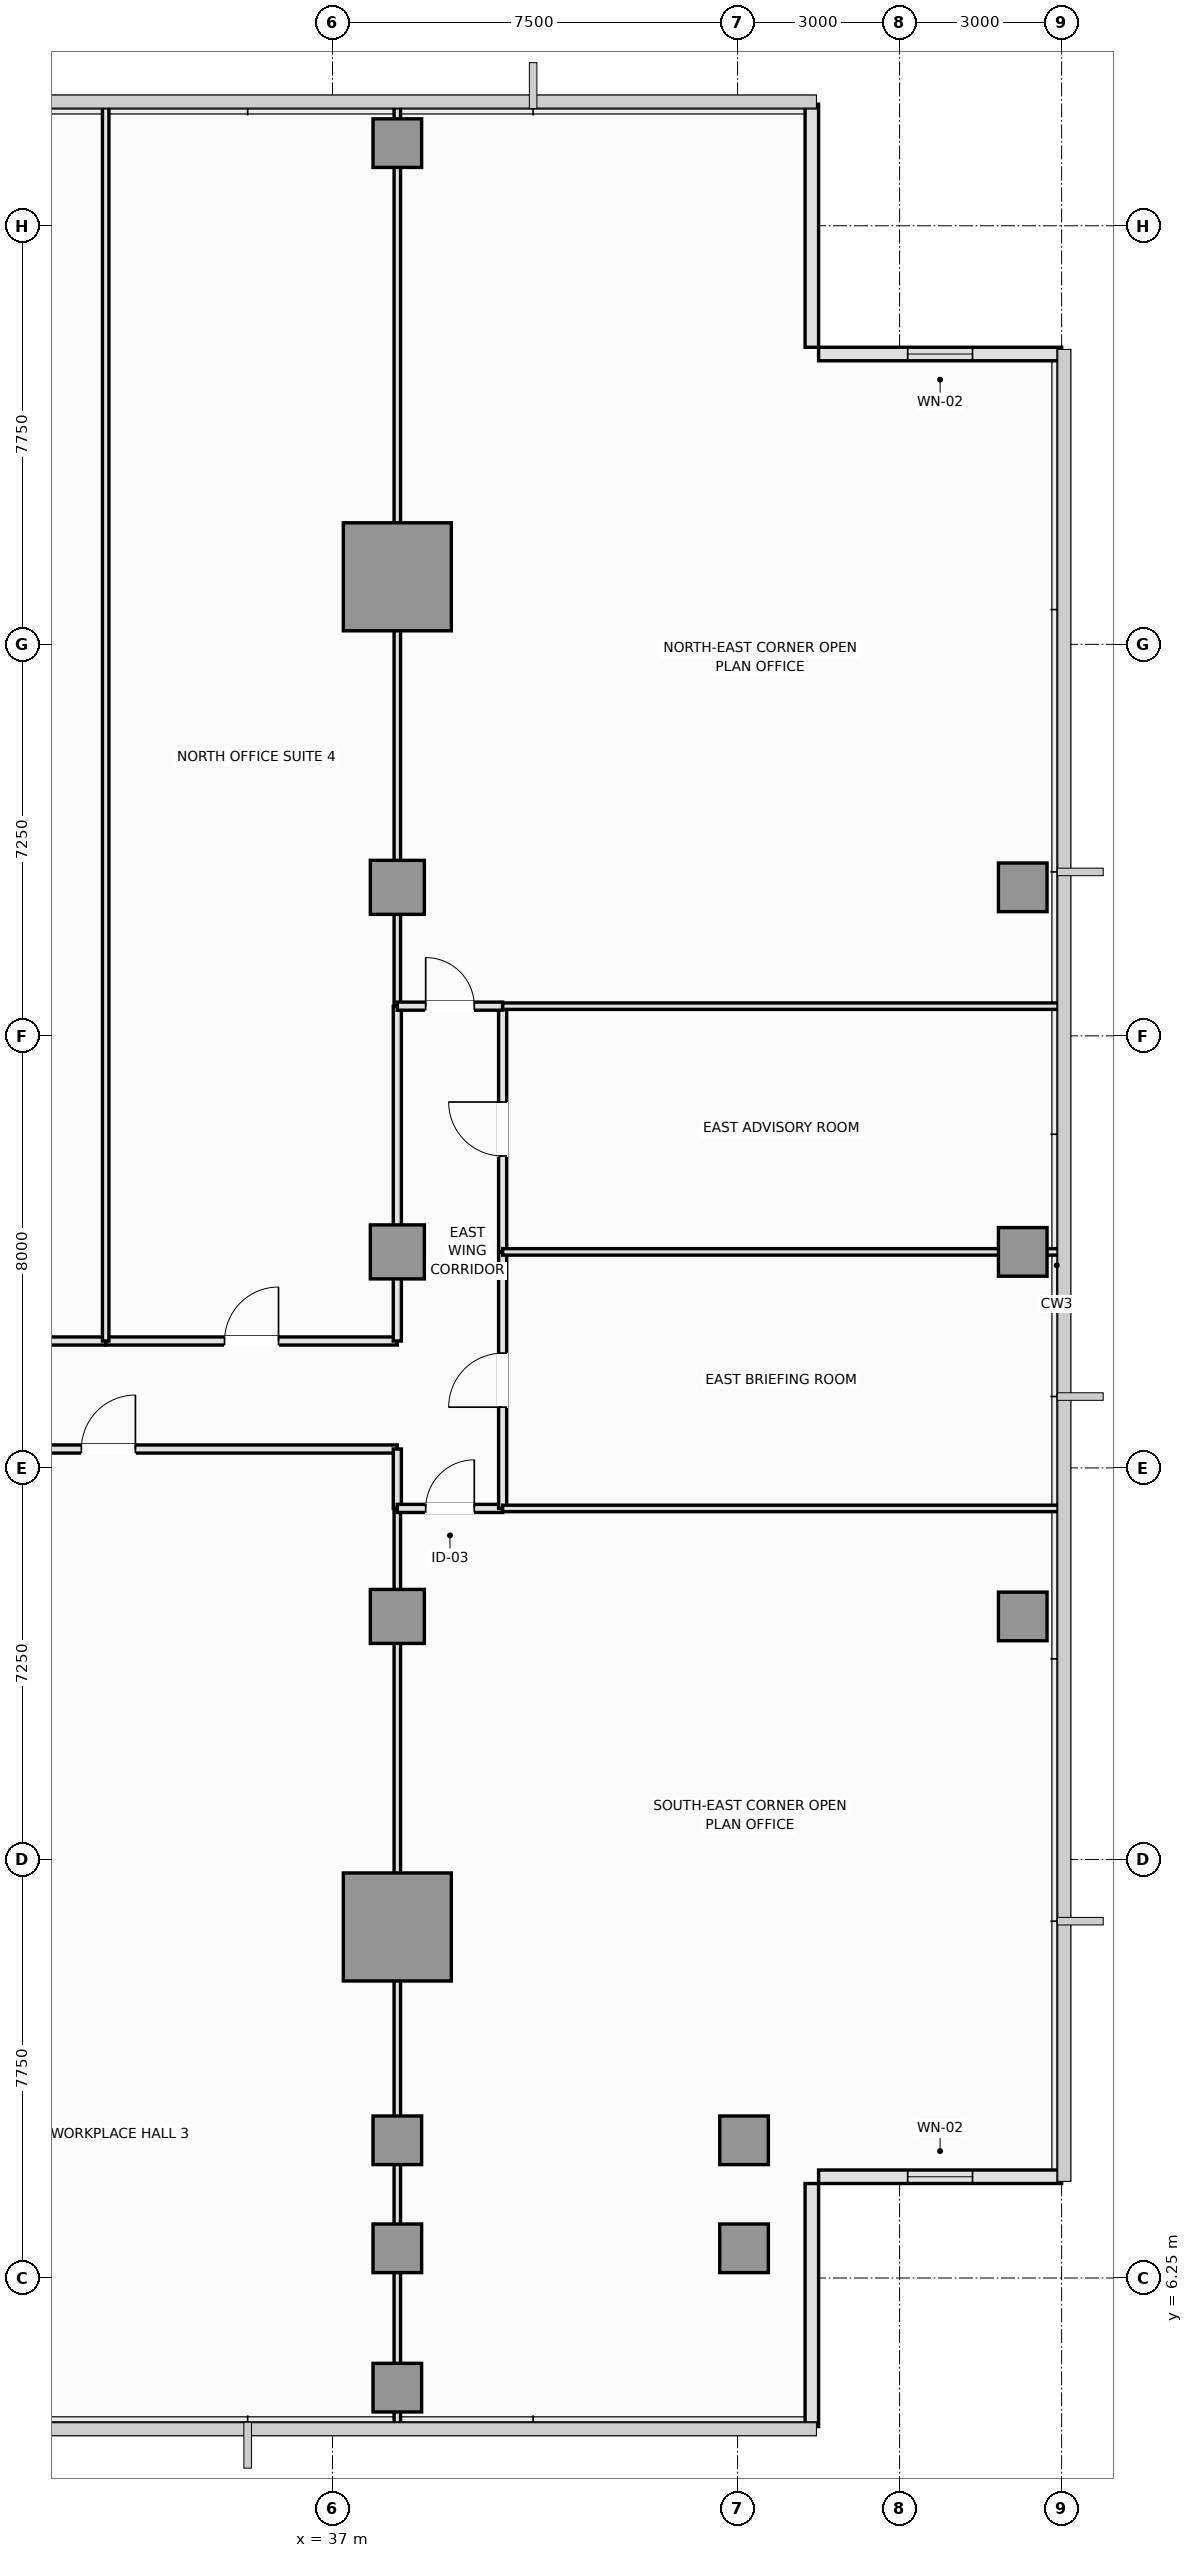
"""IFC4 building model, lengths in metres.
Left out: names, types, materials, properties, quantities, classifications, styles, units other than length and angle.
Written with IfcOpenShell. Run it as: python <this file> out.ifc"""

import sys

from ifc_helpers import new_model, si_unit, direction, frame, frame_2d, origin, origin_2d, place, context, subcontext, project, spatial, rectangle, extrude, element, fill, save


model = new_model("IFC4")
c1 = context("Model", 3, precision=1e-05, world=origin(), true_north=direction((0.0, 1.0)))
c2 = subcontext(c1, "Body", "Model", "MODEL_VIEW")
j1 = project(units=[si_unit("LENGTHUNIT", "METRE"), si_unit("PLANEANGLEUNIT", "RADIAN")], contexts=[c1])
p1 = place(None, origin())
s1 = spatial("IfcSite", under=j1, at=p1, CompositionType="ELEMENT")
p2 = place(p1, origin())
s2 = spatial("IfcBuilding", under=s1, at=p2, CompositionType="ELEMENT")
p3 = place(p2, frame((0.0, 0.0, 166.15)))
s3 = spatial("IfcBuildingStorey", under=s2, at=p3, CompositionType="ELEMENT", Elevation=166.15)
for number, where, z_axis, x_axis in (
    (1, (38.2, 12.75, 0.0), (0.0, 0.0, 1.0), (1.0, 0.0, 0.0)),
    (2, (38.2, 37.75, 0.0), (0.0, 0.0, 1.0), (1.0, 0.0, 0.0)),
):
    element("IfcColumn", number, at=place(p3, frame(where, z_axis=z_axis, x_axis=x_axis)), inside=s3, PredefinedType="COLUMN", context=c2, shape_type="SweptSolid", body=[
        extrude(rectangle(XDim=2.0, YDim=2.0, at=origin_2d()), origin(), (0.0, 0.0, 1.0), 3.55),
    ])
for number, where, z_axis, x_axis in (
    (3, (38.2, 18.5, 0.0), (0.0, 0.0, 1.0), (1.0, 0.0, 0.0)),
    (4, (38.2, 25.25, 0.0), (0.0, 0.0, 1.0), (1.0, 0.0, 0.0)),
    (5, (38.2, 32.0, 0.0), (0.0, 0.0, 1.0), (1.0, 0.0, 0.0)),
):
    element("IfcColumn", number, at=place(p3, frame(where, z_axis=z_axis, x_axis=x_axis)), inside=s3, PredefinedType="COLUMN", context=c2, shape_type="SweptSolid", body=[
        extrude(rectangle(XDim=1.0, YDim=1.0, at=origin_2d()), origin(), (0.0, 0.0, 1.0), 3.55),
    ])
for number, where, z_axis, x_axis in (
    (6, (38.2, 6.8, 0.0), (0.0, 0.0, 1.0), (1.0, 0.0, 0.0)),
    (7, (38.2, 8.8, 0.0), (0.0, 0.0, 1.0), (1.0, 0.0, 0.0)),
    (8, (44.62, 6.8, 0.0), (0.0, 0.0, 1.0), (1.0, 0.0, 0.0)),
    (9, (44.62, 8.8, 0.0), (0.0, 0.0, 1.0), (1.0, 0.0, 0.0)),
    (10, (49.78, 18.5, 0.0), (0.0, 0.0, 1.0), (1.0, 0.0, 0.0)),
    (11, (49.78, 25.25, 0.0), (0.0, 0.0, 1.0), (1.0, 0.0, 0.0)),
    (12, (49.78, 32.0, 0.0), (0.0, 0.0, 1.0), (1.0, 0.0, 0.0)),
    (13, (38.2, 4.22, 0.0), (0.0, 0.0, 1.0), (1.0, 0.0, 0.0)),
    (14, (38.2, 45.78, 0.0), (0.0, 0.0, 1.0), (1.0, 0.0, 0.0)),
):
    element("IfcColumn", number, at=place(p3, frame(where, z_axis=z_axis, x_axis=x_axis)), inside=s3, PredefinedType="COLUMN", context=c2, shape_type="SweptSolid", body=[
        extrude(rectangle(XDim=0.9, YDim=0.9, at=origin_2d()), origin(), (0.0, 0.0, 1.0), 3.55),
    ])
p4 = place(p3, frame((45.875, 3.5, 0.0), z_axis=(0.0, 0.0, 1.0), x_axis=(0.0, 1.0, 0.0)))
e15 = element("IfcWall", 15, at=p4, inside=s3, PredefinedType="SOLIDWALL", context=c2, shape_type="SweptSolid", body=[
    extrude(rectangle(XDim=4.5, YDim=0.25, at=frame_2d((2.25, 0.0))), origin(), (0.0, 0.0, 1.0), 3.37),
])
p5 = place(p3, frame((46.0, 8.125, 0.0), z_axis=(0.0, 0.0, 1.0), x_axis=(1.0, 0.0, 0.0)))
e16 = element("IfcWall", 16, at=p5, inside=s3, PredefinedType="SOLIDWALL", context=c2, shape_type="SweptSolid", body=[
    extrude(rectangle(XDim=4.5, YDim=0.25, at=frame_2d((2.25, 0.0))), origin(), (0.0, 0.0, 1.0), 3.37),
])
p6 = place(p5, frame((1.65, 0.0, 0.9)))
e17 = element("IfcOpeningElement", 17, at=p6, cuts=e16, PredefinedType="OPENING", context=c2, shape_type="SweptSolid", body=[
    extrude(rectangle(XDim=1.2, YDim=1.8, at=frame_2d((0.6, 0.9))), frame((0.0, 0.135, 0.0), z_axis=(0.0, -1.0, 0.0), x_axis=(1.0, 0.0, 0.0)), (0.0, 0.0, 1.0), 0.27),
])
p7 = place(p3, frame((50.5, 41.875, 0.0), z_axis=(0.0, 0.0, 1.0), x_axis=(-1.0, 0.0, 0.0)))
e18 = element("IfcWall", 18, at=p7, inside=s3, PredefinedType="SOLIDWALL", context=c2, shape_type="SweptSolid", body=[
    extrude(rectangle(XDim=4.5, YDim=0.25, at=frame_2d((2.25, 0.0))), origin(), (0.0, 0.0, 1.0), 3.37),
])
p8 = place(p7, frame((1.65, 0.0, 0.9)))
e19 = element("IfcOpeningElement", 19, at=p8, cuts=e18, PredefinedType="OPENING", context=c2, shape_type="SweptSolid", body=[
    extrude(rectangle(XDim=1.2, YDim=1.8, at=frame_2d((0.6, 0.9))), frame((0.0, 0.135, 0.0), z_axis=(0.0, -1.0, 0.0), x_axis=(1.0, 0.0, 0.0)), (0.0, 0.0, 1.0), 0.27),
])
p9 = place(p3, frame((45.875, 42.0, 0.0), z_axis=(0.0, 0.0, 1.0), x_axis=(0.0, 1.0, 0.0)))
e20 = element("IfcWall", 20, at=p9, inside=s3, PredefinedType="SOLIDWALL", context=c2, shape_type="SweptSolid", body=[
    extrude(rectangle(XDim=4.5, YDim=0.25, at=frame_2d((2.25, 0.0))), origin(), (0.0, 0.0, 1.0), 3.37),
])
p10 = place(p3, frame((27.5, 21.6, 0.0), z_axis=(0.0, 0.0, 1.0), x_axis=(1.0, 0.0, 0.0)))
e21 = element("IfcWall", 21, at=p10, inside=s3, PredefinedType="PARTITIONING", context=c2, shape_type="SweptSolid", body=[
    extrude(rectangle(XDim=10.7, YDim=0.15, at=frame_2d((5.35, 0.0))), origin(), (0.0, 0.0, 1.0), 3.37),
])
p11 = place(p10, frame((4.85, 0.0, 0.0)))
e22 = element("IfcOpeningElement", 22, at=p11, cuts=e21, PredefinedType="OPENING", context=c2, shape_type="SweptSolid", body=[
    extrude(rectangle(XDim=1.0, YDim=2.15, at=frame_2d((0.5, 1.075))), frame((0.0, 0.085, 0.0), z_axis=(0.0, -1.0, 0.0), x_axis=(1.0, 0.0, 0.0)), (0.0, 0.0, 1.0), 0.17),
])
p12 = place(p3, frame((27.5, 23.6, 0.0), z_axis=(0.0, 0.0, 1.0), x_axis=(1.0, 0.0, 0.0)))
e23 = element("IfcWall", 23, at=p12, inside=s3, PredefinedType="PARTITIONING", context=c2, shape_type="SweptSolid", body=[
    extrude(rectangle(XDim=5.3, YDim=0.15, at=frame_2d((2.65, 0.0))), origin(), (0.0, 0.0, 1.0), 3.37),
])
p13 = place(p12, frame((2.15, 0.0, 0.0)))
e24 = element("IfcOpeningElement", 24, at=p13, cuts=e23, PredefinedType="OPENING", context=c2, shape_type="SweptSolid", body=[
    extrude(rectangle(XDim=1.0, YDim=2.15, at=frame_2d((0.5, 1.075))), frame((0.0, 0.085, 0.0), z_axis=(0.0, -1.0, 0.0), x_axis=(1.0, 0.0, 0.0)), (0.0, 0.0, 1.0), 0.17),
])
p14 = place(p3, frame((32.8, 23.6, 0.0), z_axis=(0.0, 0.0, 1.0), x_axis=(1.0, 0.0, 0.0)))
e25 = element("IfcWall", 25, at=p14, inside=s3, PredefinedType="PARTITIONING", context=c2, shape_type="SweptSolid", body=[
    extrude(rectangle(XDim=5.4, YDim=0.15, at=frame_2d((2.7, 0.0))), origin(), (0.0, 0.0, 1.0), 3.37),
])
p15 = place(p14, frame((2.2, 0.0, 0.0)))
e26 = element("IfcOpeningElement", 26, at=p15, cuts=e25, PredefinedType="OPENING", context=c2, shape_type="SweptSolid", body=[
    extrude(rectangle(XDim=1.0, YDim=2.15, at=frame_2d((0.5, 1.075))), frame((0.0, 0.085, 0.0), z_axis=(0.0, -1.0, 0.0), x_axis=(1.0, 0.0, 0.0)), (0.0, 0.0, 1.0), 0.17),
])
p16 = place(p3, frame((38.2, 20.5, 0.0), z_axis=(0.0, 0.0, 1.0), x_axis=(0.0, 1.0, 0.0)))
e27 = element("IfcWall", 27, at=p16, inside=s3, PredefinedType="PARTITIONING", context=c2, shape_type="SweptSolid", body=[
    extrude(rectangle(XDim=1.1, YDim=0.15, at=frame_2d((0.55, 0.0))), origin(), (0.0, 0.0, 1.0), 2.87),
])
p17 = place(p3, frame((38.2, 3.51, 0.0), z_axis=(0.0, 0.0, 1.0), x_axis=(0.0, 1.0, 0.0)))
e28 = element("IfcWall", 28, at=p17, inside=s3, PredefinedType="PARTITIONING", context=c2, shape_type="SweptSolid", body=[
    extrude(rectangle(XDim=16.99, YDim=0.12, at=frame_2d((8.495, 0.0))), origin(), (0.0, 0.0, 1.0), 2.87),
])
p18 = place(p3, frame((32.8, 23.6, 0.0), z_axis=(0.0, 0.0, 1.0), x_axis=(0.0, 1.0, 0.0)))
e29 = element("IfcWall", 29, at=p18, inside=s3, PredefinedType="PARTITIONING", context=c2, shape_type="SweptSolid", body=[
    extrude(rectangle(XDim=22.89, YDim=0.12, at=frame_2d((11.445, 0.0))), origin(), (0.0, 0.0, 1.0), 3.37),
])
p19 = place(p3, frame((38.2, 23.6, 0.0), z_axis=(0.0, 0.0, 1.0), x_axis=(0.0, 1.0, 0.0)))
e30 = element("IfcWall", 30, at=p19, inside=s3, PredefinedType="PARTITIONING", context=c2, shape_type="SweptSolid", body=[
    extrude(rectangle(XDim=6.2, YDim=0.15, at=frame_2d((3.1, 0.0))), origin(), (0.0, 0.0, 1.0), 2.87),
])
p20 = place(p3, frame((38.2, 29.8, 0.0), z_axis=(0.0, 0.0, 1.0), x_axis=(0.0, 1.0, 0.0)))
e31 = element("IfcWall", 31, at=p20, inside=s3, PredefinedType="PARTITIONING", context=c2, shape_type="SweptSolid", body=[
    extrude(rectangle(XDim=16.69, YDim=0.12, at=frame_2d((8.345, 0.0))), origin(), (0.0, 0.0, 1.0), 2.87),
])
p21 = place(p3, frame((38.2, 20.5, 0.0), z_axis=(0.0, 0.0, 1.0), x_axis=(1.0, 0.0, 0.0)))
e32 = element("IfcWall", 32, at=p21, inside=s3, PredefinedType="PARTITIONING", context=c2, shape_type="SweptSolid", body=[
    extrude(rectangle(XDim=1.95, YDim=0.15, at=frame_2d((0.975, 0.0))), origin(), (0.0, 0.0, 1.0), 3.37),
])
p22 = place(p21, frame((0.525, 0.0, 0.0)))
e33 = element("IfcOpeningElement", 33, at=p22, cuts=e32, PredefinedType="OPENING", context=c2, shape_type="SweptSolid", body=[
    extrude(rectangle(XDim=0.9, YDim=2.1, at=frame_2d((0.45, 1.05))), frame((0.0, 0.085, 0.0), z_axis=(0.0, -1.0, 0.0), x_axis=(1.0, 0.0, 0.0)), (0.0, 0.0, 1.0), 0.17),
])
p23 = place(p3, frame((40.15, 20.5, 0.0), z_axis=(0.0, 0.0, 1.0), x_axis=(0.0, 1.0, 0.0)))
e34 = element("IfcWall", 34, at=p23, inside=s3, PredefinedType="PARTITIONING", context=c2, shape_type="SweptSolid", body=[
    extrude(rectangle(XDim=4.75, YDim=0.15, at=frame_2d((2.375, 0.0))), origin(), (0.0, 0.0, 1.0), 3.37),
])
p24 = place(p23, frame((1.875, 0.0, 0.0)))
e35 = element("IfcOpeningElement", 35, at=p24, cuts=e34, PredefinedType="OPENING", context=c2, shape_type="SweptSolid", body=[
    extrude(rectangle(XDim=1.0, YDim=2.15, at=frame_2d((0.5, 1.075))), frame((0.0, 0.085, 0.0), z_axis=(0.0, -1.0, 0.0), x_axis=(1.0, 0.0, 0.0)), (0.0, 0.0, 1.0), 0.17),
])
p25 = place(p3, frame((40.15, 25.25, 0.0), z_axis=(0.0, 0.0, 1.0), x_axis=(0.0, 1.0, 0.0)))
e36 = element("IfcWall", 36, at=p25, inside=s3, PredefinedType="PARTITIONING", context=c2, shape_type="SweptSolid", body=[
    extrude(rectangle(XDim=4.55, YDim=0.15, at=frame_2d((2.275, 0.0))), origin(), (0.0, 0.0, 1.0), 3.37),
])
p26 = place(p25, frame((1.775, 0.0, 0.0)))
e37 = element("IfcOpeningElement", 37, at=p26, cuts=e36, PredefinedType="OPENING", context=c2, shape_type="SweptSolid", body=[
    extrude(rectangle(XDim=1.0, YDim=2.15, at=frame_2d((0.5, 1.075))), frame((0.0, 0.085, 0.0), z_axis=(0.0, -1.0, 0.0), x_axis=(1.0, 0.0, 0.0)), (0.0, 0.0, 1.0), 0.17),
])
p27 = place(p3, frame((38.2, 29.8, 0.0), z_axis=(0.0, 0.0, 1.0), x_axis=(1.0, 0.0, 0.0)))
e38 = element("IfcWall", 38, at=p27, inside=s3, PredefinedType="PARTITIONING", context=c2, shape_type="SweptSolid", body=[
    extrude(rectangle(XDim=1.95, YDim=0.15, at=frame_2d((0.975, 0.0))), origin(), (0.0, 0.0, 1.0), 3.37),
])
p28 = place(p27, frame((0.525, 0.0, 0.0)))
e39 = element("IfcOpeningElement", 39, at=p28, cuts=e38, PredefinedType="OPENING", context=c2, shape_type="SweptSolid", body=[
    extrude(rectangle(XDim=0.9, YDim=2.1, at=frame_2d((0.45, 1.05))), frame((0.0, 0.085, 0.0), z_axis=(0.0, -1.0, 0.0), x_axis=(1.0, 0.0, 0.0)), (0.0, 0.0, 1.0), 0.17),
])
p29 = place(p3, frame((40.15, 20.5, 0.0), z_axis=(0.0, 0.0, 1.0), x_axis=(1.0, 0.0, 0.0)))
e40 = element("IfcWall", 40, at=p29, inside=s3, PredefinedType="PARTITIONING", context=c2, shape_type="SweptSolid", body=[
    extrude(rectangle(XDim=10.34, YDim=0.12, at=frame_2d((5.17, 0.0))), origin(), (0.0, 0.0, 1.0), 3.37),
])
p30 = place(p3, frame((40.15, 25.25, 0.0), z_axis=(0.0, 0.0, 1.0), x_axis=(1.0, 0.0, 0.0)))
e41 = element("IfcWall", 41, at=p30, inside=s3, PredefinedType="PARTITIONING", context=c2, shape_type="SweptSolid", body=[
    extrude(rectangle(XDim=10.34, YDim=0.12, at=frame_2d((5.17, 0.0))), origin(), (0.0, 0.0, 1.0), 2.77),
])
p31 = place(p3, frame((40.15, 29.8, 0.0), z_axis=(0.0, 0.0, 1.0), x_axis=(1.0, 0.0, 0.0)))
e42 = element("IfcWall", 42, at=p31, inside=s3, PredefinedType="PARTITIONING", context=c2, shape_type="SweptSolid", body=[
    extrude(rectangle(XDim=10.34, YDim=0.12, at=frame_2d((5.17, 0.0))), origin(), (0.0, 0.0, 1.0), 3.37),
])
p32 = place(p6, origin())
e43 = element("IfcWindow", 43, at=p32, inside=s3, PartitioningType="SINGLE_PANEL", PredefinedType="WINDOW", context=c2, shape_type="SweptSolid", body=[
    extrude(rectangle(XDim=1.2, YDim=1.8, at=frame_2d((0.6, 0.9))), frame((0.0, 0.03, 0.0), z_axis=(0.0, -1.0, 0.0), x_axis=(1.0, 0.0, 0.0)), (0.0, 0.0, 1.0), 0.06),
])
fill(e17, e43)
p33 = place(p8, origin())
e44 = element("IfcWindow", 44, at=p33, inside=s3, PartitioningType="SINGLE_PANEL", PredefinedType="WINDOW", context=c2, shape_type="SweptSolid", body=[
    extrude(rectangle(XDim=1.2, YDim=1.8, at=frame_2d((0.6, 0.9))), frame((0.0, 0.03, 0.0), z_axis=(0.0, -1.0, 0.0), x_axis=(1.0, 0.0, 0.0)), (0.0, 0.0, 1.0), 0.06),
])
fill(e19, e44)
p34 = place(p11, origin())
e45 = element("IfcDoor", 45, at=p34, inside=s3, OperationType="SINGLE_SWING_RIGHT", PredefinedType="DOOR", context=c2, shape_type="SweptSolid", body=[
    extrude(rectangle(XDim=1.0, YDim=2.15, at=frame_2d((0.5, 1.075))), frame((0.0, 0.025, 0.0), z_axis=(0.0, -1.0, 0.0), x_axis=(1.0, 0.0, 0.0)), (0.0, 0.0, 1.0), 0.05),
])
fill(e22, e45)
p35 = place(p15, origin())
e46 = element("IfcDoor", 46, at=p35, inside=s3, OperationType="SINGLE_SWING_RIGHT", PredefinedType="DOOR", context=c2, shape_type="SweptSolid", body=[
    extrude(rectangle(XDim=1.0, YDim=2.15, at=frame_2d((0.5, 1.075))), frame((0.0, 0.025, 0.0), z_axis=(0.0, -1.0, 0.0), x_axis=(1.0, 0.0, 0.0)), (0.0, 0.0, 1.0), 0.05),
])
fill(e26, e46)
p36 = place(p22, origin())
e47 = element("IfcDoor", 47, at=p36, inside=s3, OperationType="SINGLE_SWING_RIGHT", PredefinedType="DOOR", context=c2, shape_type="SweptSolid", body=[
    extrude(rectangle(XDim=0.9, YDim=2.1, at=frame_2d((0.45, 1.05))), frame((0.0, 0.025, 0.0), z_axis=(0.0, -1.0, 0.0), x_axis=(1.0, 0.0, 0.0)), (0.0, 0.0, 1.0), 0.05),
])
fill(e33, e47)
p37 = place(p24, origin())
e48 = element("IfcDoor", 48, at=p37, inside=s3, OperationType="SINGLE_SWING_LEFT", PredefinedType="DOOR", context=c2, shape_type="SweptSolid", body=[
    extrude(rectangle(XDim=1.0, YDim=2.15, at=frame_2d((0.5, 1.075))), frame((0.0, 0.025, 0.0), z_axis=(0.0, -1.0, 0.0), x_axis=(1.0, 0.0, 0.0)), (0.0, 0.0, 1.0), 0.05),
])
fill(e35, e48)
p38 = place(p26, origin())
e49 = element("IfcDoor", 49, at=p38, inside=s3, OperationType="SINGLE_SWING_RIGHT", PredefinedType="DOOR", context=c2, shape_type="SweptSolid", body=[
    extrude(rectangle(XDim=1.0, YDim=2.15, at=frame_2d((0.5, 1.075))), frame((0.0, 0.025, 0.0), z_axis=(0.0, -1.0, 0.0), x_axis=(1.0, 0.0, 0.0)), (0.0, 0.0, 1.0), 0.05),
])
fill(e37, e49)
p39 = place(p28, origin())
e50 = element("IfcDoor", 50, at=p39, inside=s3, OperationType="SINGLE_SWING_LEFT", PredefinedType="DOOR", context=c2, shape_type="SweptSolid", body=[
    extrude(rectangle(XDim=0.9, YDim=2.1, at=frame_2d((0.45, 1.05))), frame((0.0, 0.025, 0.0), z_axis=(0.0, -1.0, 0.0), x_axis=(1.0, 0.0, 0.0)), (0.0, 0.0, 1.0), 0.05),
])
fill(e39, e50)
save(model, sys.argv[1])
